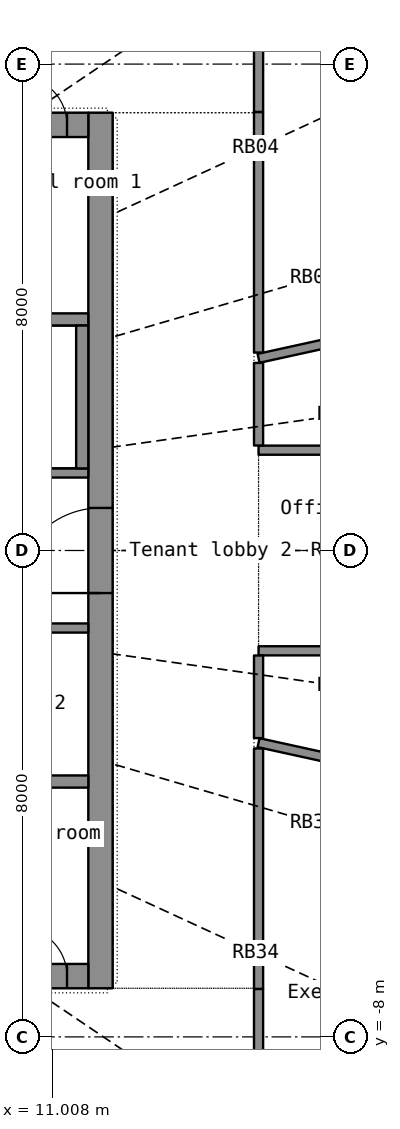
"""IFC4 building model, lengths in metres.
Left out: names, types, materials, properties, quantities, classifications, styles, units other than length and angle.
Written with IfcOpenShell. Run it as: python <this file> out.ifc"""

import sys

from ifc_helpers import new_model, si_unit, direction, frame, frame_2d, origin, place, context, subcontext, project, spatial, rectangle, extrude, element, fill, save


model = new_model("IFC4")
c1 = context("Model", 3, precision=1e-05, world=origin(), true_north=direction((0.0, 1.0)))
c2 = subcontext(c1, "Body", "Model", "MODEL_VIEW")
j1 = project(units=[si_unit("LENGTHUNIT", "METRE"), si_unit("PLANEANGLEUNIT", "RADIAN")], contexts=[c1])
p1 = place(None, origin())
s1 = spatial("IfcSite", under=j1, at=p1, CompositionType="ELEMENT")
p2 = place(p1, origin())
s2 = spatial("IfcBuilding", under=s1, at=p2, CompositionType="ELEMENT")
p3 = place(p2, frame((0.0, 0.0, 246.7)))
s3 = spatial("IfcBuildingStorey", under=s2, at=p3, CompositionType="ELEMENT", Elevation=246.7)
p4 = place(p3, frame((11.8, -7.2, 0.0), z_axis=(0.0, 0.0, 1.0), x_axis=(0.0, 1.0, 0.0)))
e1 = element("IfcWall", 1, at=p4, inside=s3, PredefinedType="SHEAR", context=c2, shape_type="SweptSolid", body=[
    extrude(rectangle(XDim=14.4, YDim=0.4, at=frame_2d((7.2, 0.0))), origin(), (0.0, 0.0, 1.0), 3.3),
])
p5 = place(p4, frame((6.5, 0.0, 0.0)))
e2 = element("IfcOpeningElement", 2, at=p5, cuts=e1, PredefinedType="OPENING", context=c2, shape_type="SweptSolid", body=[
    extrude(rectangle(XDim=1.4, YDim=2.2, at=frame_2d((0.7, 1.1))), frame((0.0, 0.21, 0.0), z_axis=(0.0, -1.0, 0.0), x_axis=(1.0, 0.0, 0.0)), (0.0, 0.0, 1.0), 0.42),
])
p6 = place(p3, frame((-11.6, -7.0, 0.0), z_axis=(0.0, 0.0, 1.0), x_axis=(1.0, 0.0, 0.0)))
e3 = element("IfcWall", 3, at=p6, inside=s3, PredefinedType="SHEAR", context=c2, shape_type="SweptSolid", body=[
    extrude(rectangle(XDim=23.2, YDim=0.4, at=frame_2d((11.6, 0.0))), origin(), (0.0, 0.0, 1.0), 3.3),
])
p7 = place(p6, frame((20.05, 0.0, 0.0)))
e4 = element("IfcOpeningElement", 4, at=p7, cuts=e3, PredefinedType="OPENING", context=c2, shape_type="SweptSolid", body=[
    extrude(rectangle(XDim=1.1, YDim=2.2, at=frame_2d((0.55, 1.1))), frame((0.0, 0.21, 0.0), z_axis=(0.0, -1.0, 0.0), x_axis=(1.0, 0.0, 0.0)), (0.0, 0.0, 1.0), 0.42),
])
p8 = place(p6, frame((5.15, 0.0, 0.0)))
e5 = element("IfcOpeningElement", 5, at=p8, cuts=e3, PredefinedType="OPENING", context=c2, shape_type="SweptSolid", body=[
    extrude(rectangle(XDim=0.9, YDim=2.1, at=frame_2d((0.45, 1.05))), frame((0.0, 0.21, 0.0), z_axis=(0.0, -1.0, 0.0), x_axis=(1.0, 0.0, 0.0)), (0.0, 0.0, 1.0), 0.42),
])
p9 = place(p6, frame((11.15, 0.0, 0.0)))
e6 = element("IfcOpeningElement", 6, at=p9, cuts=e3, PredefinedType="OPENING", context=c2, shape_type="SweptSolid", body=[
    extrude(rectangle(XDim=0.9, YDim=2.1, at=frame_2d((0.45, 1.05))), frame((0.0, 0.21, 0.0), z_axis=(0.0, -1.0, 0.0), x_axis=(1.0, 0.0, 0.0)), (0.0, 0.0, 1.0), 0.42),
])
p10 = place(p6, frame((16.15, 0.0, 0.0)))
e7 = element("IfcOpeningElement", 7, at=p10, cuts=e3, PredefinedType="OPENING", context=c2, shape_type="SweptSolid", body=[
    extrude(rectangle(XDim=0.9, YDim=2.1, at=frame_2d((0.45, 1.05))), frame((0.0, 0.21, 0.0), z_axis=(0.0, -1.0, 0.0), x_axis=(1.0, 0.0, 0.0)), (0.0, 0.0, 1.0), 0.42),
])
p11 = place(p6, frame((0.35, 0.0, 0.0)))
e8 = element("IfcOpeningElement", 8, at=p11, cuts=e3, PredefinedType="OPENING", context=c2, shape_type="SweptSolid", body=[
    extrude(rectangle(XDim=0.8, YDim=2.05, at=frame_2d((0.4, 1.025))), frame((0.0, 0.21, 0.0), z_axis=(0.0, -1.0, 0.0), x_axis=(1.0, 0.0, 0.0)), (0.0, 0.0, 1.0), 0.42),
])
p12 = place(p6, frame((22.05, 0.0, 0.0)))
e9 = element("IfcOpeningElement", 9, at=p12, cuts=e3, PredefinedType="OPENING", context=c2, shape_type="SweptSolid", body=[
    extrude(rectangle(XDim=0.8, YDim=2.05, at=frame_2d((0.4, 1.025))), frame((0.0, 0.21, 0.0), z_axis=(0.0, -1.0, 0.0), x_axis=(1.0, 0.0, 0.0)), (0.0, 0.0, 1.0), 0.42),
])
p13 = place(p3, frame((-11.6, 7.0, 0.0), z_axis=(0.0, 0.0, 1.0), x_axis=(1.0, 0.0, 0.0)))
e10 = element("IfcWall", 10, at=p13, inside=s3, PredefinedType="SHEAR", context=c2, shape_type="SweptSolid", body=[
    extrude(rectangle(XDim=23.2, YDim=0.4, at=frame_2d((11.6, 0.0))), origin(), (0.0, 0.0, 1.0), 3.3),
])
p14 = place(p13, frame((2.05, 0.0, 0.0)))
e11 = element("IfcOpeningElement", 11, at=p14, cuts=e10, PredefinedType="OPENING", context=c2, shape_type="SweptSolid", body=[
    extrude(rectangle(XDim=1.1, YDim=2.2, at=frame_2d((0.55, 1.1))), frame((0.0, 0.21, 0.0), z_axis=(0.0, -1.0, 0.0), x_axis=(1.0, 0.0, 0.0)), (0.0, 0.0, 1.0), 0.42),
])
p15 = place(p13, frame((6.05, 0.0, 0.0)))
e12 = element("IfcOpeningElement", 12, at=p15, cuts=e10, PredefinedType="OPENING", context=c2, shape_type="SweptSolid", body=[
    extrude(rectangle(XDim=1.1, YDim=2.2, at=frame_2d((0.55, 1.1))), frame((0.0, 0.21, 0.0), z_axis=(0.0, -1.0, 0.0), x_axis=(1.0, 0.0, 0.0)), (0.0, 0.0, 1.0), 0.42),
])
p16 = place(p13, frame((8.05, 0.0, 0.0)))
e13 = element("IfcOpeningElement", 13, at=p16, cuts=e10, PredefinedType="OPENING", context=c2, shape_type="SweptSolid", body=[
    extrude(rectangle(XDim=1.1, YDim=2.2, at=frame_2d((0.55, 1.1))), frame((0.0, 0.21, 0.0), z_axis=(0.0, -1.0, 0.0), x_axis=(1.0, 0.0, 0.0)), (0.0, 0.0, 1.0), 0.42),
])
p17 = place(p13, frame((10.05, 0.0, 0.0)))
e14 = element("IfcOpeningElement", 14, at=p17, cuts=e10, PredefinedType="OPENING", context=c2, shape_type="SweptSolid", body=[
    extrude(rectangle(XDim=1.1, YDim=2.2, at=frame_2d((0.55, 1.1))), frame((0.0, 0.21, 0.0), z_axis=(0.0, -1.0, 0.0), x_axis=(1.0, 0.0, 0.0)), (0.0, 0.0, 1.0), 0.42),
])
p18 = place(p13, frame((12.05, 0.0, 0.0)))
e15 = element("IfcOpeningElement", 15, at=p18, cuts=e10, PredefinedType="OPENING", context=c2, shape_type="SweptSolid", body=[
    extrude(rectangle(XDim=1.1, YDim=2.2, at=frame_2d((0.55, 1.1))), frame((0.0, 0.21, 0.0), z_axis=(0.0, -1.0, 0.0), x_axis=(1.0, 0.0, 0.0)), (0.0, 0.0, 1.0), 0.42),
])
p19 = place(p13, frame((14.05, 0.0, 0.0)))
e16 = element("IfcOpeningElement", 16, at=p19, cuts=e10, PredefinedType="OPENING", context=c2, shape_type="SweptSolid", body=[
    extrude(rectangle(XDim=1.1, YDim=2.2, at=frame_2d((0.55, 1.1))), frame((0.0, 0.21, 0.0), z_axis=(0.0, -1.0, 0.0), x_axis=(1.0, 0.0, 0.0)), (0.0, 0.0, 1.0), 0.42),
])
p20 = place(p13, frame((16.05, 0.0, 0.0)))
e17 = element("IfcOpeningElement", 17, at=p20, cuts=e10, PredefinedType="OPENING", context=c2, shape_type="SweptSolid", body=[
    extrude(rectangle(XDim=1.1, YDim=2.2, at=frame_2d((0.55, 1.1))), frame((0.0, 0.21, 0.0), z_axis=(0.0, -1.0, 0.0), x_axis=(1.0, 0.0, 0.0)), (0.0, 0.0, 1.0), 0.42),
])
p21 = place(p13, frame((18.05, 0.0, 0.0)))
e18 = element("IfcOpeningElement", 18, at=p21, cuts=e10, PredefinedType="OPENING", context=c2, shape_type="SweptSolid", body=[
    extrude(rectangle(XDim=1.1, YDim=2.2, at=frame_2d((0.55, 1.1))), frame((0.0, 0.21, 0.0), z_axis=(0.0, -1.0, 0.0), x_axis=(1.0, 0.0, 0.0)), (0.0, 0.0, 1.0), 0.42),
])
p22 = place(p13, frame((20.05, 0.0, 0.0)))
e19 = element("IfcOpeningElement", 19, at=p22, cuts=e10, PredefinedType="OPENING", context=c2, shape_type="SweptSolid", body=[
    extrude(rectangle(XDim=1.1, YDim=2.2, at=frame_2d((0.55, 1.1))), frame((0.0, 0.21, 0.0), z_axis=(0.0, -1.0, 0.0), x_axis=(1.0, 0.0, 0.0)), (0.0, 0.0, 1.0), 0.42),
])
p23 = place(p13, frame((4.15, 0.0, 0.0)))
e20 = element("IfcOpeningElement", 20, at=p23, cuts=e10, PredefinedType="OPENING", context=c2, shape_type="SweptSolid", body=[
    extrude(rectangle(XDim=0.9, YDim=2.1, at=frame_2d((0.45, 1.05))), frame((0.0, 0.21, 0.0), z_axis=(0.0, -1.0, 0.0), x_axis=(1.0, 0.0, 0.0)), (0.0, 0.0, 1.0), 0.42),
])
p24 = place(p13, frame((0.35, 0.0, 0.0)))
e21 = element("IfcOpeningElement", 21, at=p24, cuts=e10, PredefinedType="OPENING", context=c2, shape_type="SweptSolid", body=[
    extrude(rectangle(XDim=0.8, YDim=2.05, at=frame_2d((0.4, 1.025))), frame((0.0, 0.21, 0.0), z_axis=(0.0, -1.0, 0.0), x_axis=(1.0, 0.0, 0.0)), (0.0, 0.0, 1.0), 0.42),
])
p25 = place(p13, frame((22.05, 0.0, 0.0)))
e22 = element("IfcOpeningElement", 22, at=p25, cuts=e10, PredefinedType="OPENING", context=c2, shape_type="SweptSolid", body=[
    extrude(rectangle(XDim=0.8, YDim=2.05, at=frame_2d((0.4, 1.025))), frame((0.0, 0.21, 0.0), z_axis=(0.0, -1.0, 0.0), x_axis=(1.0, 0.0, 0.0)), (0.0, 0.0, 1.0), 0.42),
])
for number, where, z_axis, x_axis in (
    (23, (-11.6, -3.8, 0.0), (0.0, 0.0, 1.0), (1.0, 0.0, 0.0)),
    (24, (-11.6, 3.8, 0.0), (0.0, 0.0, 1.0), (1.0, 0.0, 0.0)),
):
    element("IfcWall", number, at=place(p3, frame(where, z_axis=z_axis, x_axis=x_axis)), inside=s3, PredefinedType="SHEAR", context=c2, shape_type="SweptSolid", body=[
        extrude(rectangle(XDim=23.2, YDim=0.2, at=frame_2d((11.6, 0.0))), origin(), (0.0, 0.0, 1.0), 3.3),
    ])
p26 = place(p3, frame((3.0, -1.275, 0.0), z_axis=(0.0, 0.0, 1.0), x_axis=(1.0, 0.0, 0.0)))
e25 = element("IfcWall", 25, at=p26, inside=s3, PredefinedType="PARTITIONING", context=c2, shape_type="SweptSolid", body=[
    extrude(rectangle(XDim=8.6, YDim=0.15, at=frame_2d((4.3, 0.0))), origin(), (0.0, 0.0, 1.0), 3.3),
])
p27 = place(p26, frame((0.82, 0.0, 0.0)))
e26 = element("IfcOpeningElement", 26, at=p27, cuts=e25, PredefinedType="OPENING", context=c2, shape_type="SweptSolid", body=[
    extrude(rectangle(XDim=0.85, YDim=2.1, at=frame_2d((0.425, 1.05))), frame((0.0, 0.085, 0.0), z_axis=(0.0, -1.0, 0.0), x_axis=(1.0, 0.0, 0.0)), (0.0, 0.0, 1.0), 0.17),
])
p28 = place(p26, frame((3.103, 0.0, 0.0)))
e27 = element("IfcOpeningElement", 27, at=p28, cuts=e25, PredefinedType="OPENING", context=c2, shape_type="SweptSolid", body=[
    extrude(rectangle(XDim=0.9, YDim=2.1, at=frame_2d((0.45, 1.05))), frame((0.0, 0.085, 0.0), z_axis=(0.0, -1.0, 0.0), x_axis=(1.0, 0.0, 0.0)), (0.0, 0.0, 1.0), 0.17),
])
p29 = place(p26, frame((6.158, 0.0, 0.0)))
e28 = element("IfcOpeningElement", 28, at=p29, cuts=e25, PredefinedType="OPENING", context=c2, shape_type="SweptSolid", body=[
    extrude(rectangle(XDim=0.9, YDim=2.1, at=frame_2d((0.45, 1.05))), frame((0.0, 0.085, 0.0), z_axis=(0.0, -1.0, 0.0), x_axis=(1.0, 0.0, 0.0)), (0.0, 0.0, 1.0), 0.17),
])
p30 = place(p3, frame((3.0, 1.275, 0.0), z_axis=(0.0, 0.0, 1.0), x_axis=(1.0, 0.0, 0.0)))
e29 = element("IfcWall", 29, at=p30, inside=s3, PredefinedType="SHEAR", context=c2, shape_type="SweptSolid", body=[
    extrude(rectangle(XDim=8.6, YDim=0.15, at=frame_2d((4.3, 0.0))), origin(), (0.0, 0.0, 1.0), 3.3),
])
p31 = place(p30, frame((2.05, 0.0, 0.0)))
e30 = element("IfcOpeningElement", 30, at=p31, cuts=e29, PredefinedType="OPENING", context=c2, shape_type="SweptSolid", body=[
    extrude(rectangle(XDim=1.1, YDim=2.15, at=frame_2d((0.55, 1.075))), frame((0.0, 0.085, 0.0), z_axis=(0.0, -1.0, 0.0), x_axis=(1.0, 0.0, 0.0)), (0.0, 0.0, 1.0), 0.17),
])
p32 = place(p30, frame((0.45, 0.0, 0.0)))
e31 = element("IfcOpeningElement", 31, at=p32, cuts=e29, PredefinedType="OPENING", context=c2, shape_type="SweptSolid", body=[
    extrude(rectangle(XDim=0.9, YDim=2.1, at=frame_2d((0.45, 1.05))), frame((0.0, 0.085, 0.0), z_axis=(0.0, -1.0, 0.0), x_axis=(1.0, 0.0, 0.0)), (0.0, 0.0, 1.0), 0.17),
])
p33 = place(p3, frame((11.5, 1.35, 0.0), z_axis=(0.0, 0.0, 1.0), x_axis=(0.0, 1.0, 0.0)))
e32 = element("IfcWall", 32, at=p33, inside=s3, PredefinedType="SHEAR", context=c2, shape_type="SweptSolid", body=[
    extrude(rectangle(XDim=2.35, YDim=0.2, at=frame_2d((1.175, 0.0))), origin(), (0.0, 0.0, 1.0), 3.3),
])
p34 = place(p3, frame((20.233, -4.441, 0.0), z_axis=(0.0, 0.0, 1.0), x_axis=(-0.976749355, 0.214384464, 0.0)))
e33 = element("IfcWall", 33, at=p34, inside=s3, PredefinedType="PARTITIONING", context=c2, shape_type="SweptSolid", body=[
    extrude(rectangle(XDim=5.972, YDim=0.15, at=frame_2d((2.986, 0.0))), origin(), (0.0, 0.0, 1.0), 2.4),
])
p35 = place(p3, frame((20.231, 4.44, 0.0), z_axis=(0.0, 0.0, 1.0), x_axis=(-0.976746641, -0.214396828, 0.0)))
e34 = element("IfcWall", 34, at=p35, inside=s3, PredefinedType="PARTITIONING", context=c2, shape_type="SweptSolid", body=[
    extrude(rectangle(XDim=5.97, YDim=0.15, at=frame_2d((2.985, 0.0))), origin(), (0.0, 0.0, 1.0), 2.4),
])
for number, where, z_axis, x_axis in (
    (35, (14.4, -7.212, 0.0), (0.0, 0.0, 1.0), (0.0, 1.0, 0.0)),
    (36, (14.4, 3.256, 0.0), (0.0, 0.0, 1.0), (0.0, 1.0, 0.0)),
):
    element("IfcWall", number, at=place(p3, frame(where, z_axis=z_axis, x_axis=x_axis)), inside=s3, PredefinedType="PARTITIONING", context=c2, shape_type="SweptSolid", body=[
        extrude(rectangle(XDim=3.956, YDim=0.15, at=frame_2d((1.978, 0.0))), origin(), (0.0, 0.0, 1.0), 2.4),
    ])
p36 = place(p3, frame((14.4, -1.65, 0.0), z_axis=(0.0, 0.0, 1.0), x_axis=(1.0, 0.0, 0.0)))
e37 = element("IfcWall", 37, at=p36, inside=s3, PredefinedType="PARTITIONING", context=c2, shape_type="SweptSolid", body=[
    extrude(rectangle(XDim=3.911, YDim=0.15, at=frame_2d((1.956, 0.0))), origin(), (0.0, 0.0, 1.0), 2.4),
])
p37 = place(p36, frame((1.156, 0.0, 0.0)))
e38 = element("IfcOpeningElement", 38, at=p37, cuts=e37, PredefinedType="OPENING", context=c2, shape_type="SweptSolid", body=[
    extrude(rectangle(XDim=1.6, YDim=2.4, at=frame_2d((0.8, 1.2))), frame((0.0, 0.085, 0.0), z_axis=(0.0, -1.0, 0.0), x_axis=(1.0, 0.0, 0.0)), (0.0, 0.0, 1.0), 0.17),
])
p38 = place(p3, frame((18.311, 1.65, 0.0), z_axis=(0.0, 0.0, 1.0), x_axis=(-1.0, 0.0, 0.0)))
e39 = element("IfcWall", 39, at=p38, inside=s3, PredefinedType="PARTITIONING", context=c2, shape_type="SweptSolid", body=[
    extrude(rectangle(XDim=3.911, YDim=0.15, at=frame_2d((1.956, 0.0))), origin(), (0.0, 0.0, 1.0), 2.4),
])
for number, where, z_axis, x_axis in (
    (40, (14.4, -9.523, 0.0), (0.0, 0.0, 1.0), (0.0, 1.0, 0.0)),
    (41, (14.4, 7.213, 0.0), (0.0, 0.0, 1.0), (0.0, 1.0, 0.0)),
):
    element("IfcWall", number, at=place(p3, frame(where, z_axis=z_axis, x_axis=x_axis)), inside=s3, PredefinedType="PARTITIONING", context=c2, shape_type="SweptSolid", body=[
        extrude(rectangle(XDim=2.31, YDim=0.15, at=frame_2d((1.155, 0.0))), origin(), (0.0, 0.0, 1.0), 2.4),
    ])
for number, where, z_axis, x_axis in (
    (42, (14.4, -3.085, 0.0), (0.0, 0.0, 1.0), (0.0, 1.0, 0.0)),
    (43, (14.4, 1.727, 0.0), (0.0, 0.0, 1.0), (0.0, 1.0, 0.0)),
):
    element("IfcWall", number, at=place(p3, frame(where, z_axis=z_axis, x_axis=x_axis)), inside=s3, PredefinedType="PARTITIONING", context=c2, shape_type="SweptSolid", body=[
        extrude(rectangle(XDim=1.358, YDim=0.15, at=frame_2d((0.679, 0.0))), origin(), (0.0, 0.0, 1.0), 2.4),
    ])
p39 = place(p12, origin())
e44 = element("IfcDoor", 44, at=p39, inside=s3, OperationType="SINGLE_SWING_LEFT", PredefinedType="DOOR", context=c2, shape_type="SweptSolid", body=[
    extrude(rectangle(XDim=0.8, YDim=2.05, at=frame_2d((0.4, 1.025))), frame((0.0, 0.025, 0.0), z_axis=(0.0, -1.0, 0.0), x_axis=(1.0, 0.0, 0.0)), (0.0, 0.0, 1.0), 0.05),
])
fill(e9, e44)
p40 = place(p25, origin())
e45 = element("IfcDoor", 45, at=p40, inside=s3, OperationType="SINGLE_SWING_LEFT", PredefinedType="DOOR", context=c2, shape_type="SweptSolid", body=[
    extrude(rectangle(XDim=0.8, YDim=2.05, at=frame_2d((0.4, 1.025))), frame((0.0, 0.025, 0.0), z_axis=(0.0, -1.0, 0.0), x_axis=(1.0, 0.0, 0.0)), (0.0, 0.0, 1.0), 0.05),
])
fill(e22, e45)
p41 = place(p5, origin())
e46 = element("IfcDoor", 46, at=p41, inside=s3, OperationType="DOUBLE_DOOR_SINGLE_SWING", PredefinedType="DOOR", context=c2, shape_type="SweptSolid", body=[
    extrude(rectangle(XDim=1.4, YDim=2.2, at=frame_2d((0.7, 1.1))), frame((0.0, 0.025, 0.0), z_axis=(0.0, -1.0, 0.0), x_axis=(1.0, 0.0, 0.0)), (0.0, 0.0, 1.0), 0.05),
])
fill(e2, e46)
save(model, sys.argv[1])
